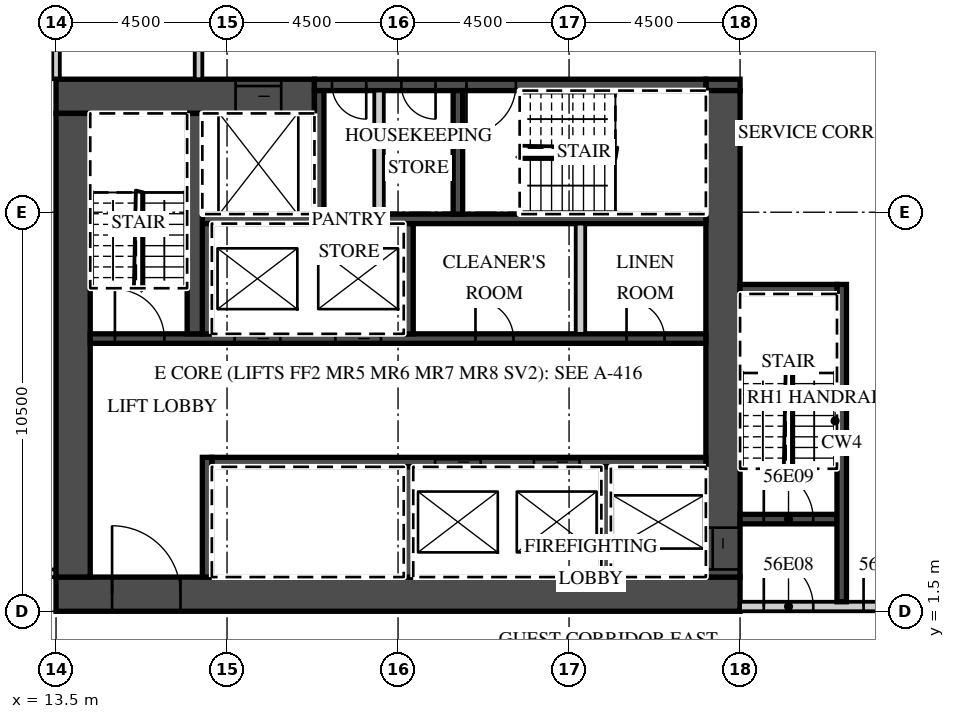
"""IFC4 building model, lengths in metres.
Left out: names, types, materials, properties, quantities, classifications, styles, units other than length and angle.
Written with IfcOpenShell. Run it as: python <this file> out.ifc"""

import sys

from ifc_helpers import new_model, si_unit, direction, frame, frame_2d, origin, place, context, subcontext, project, spatial, rectangle, extrude, element, fill, save


model = new_model("IFC4")
c1 = context("Model", 3, precision=1e-05, world=origin(), true_north=direction((0.0, 1.0)))
c2 = subcontext(c1, "Body", "Model", "MODEL_VIEW")
j1 = project(units=[si_unit("LENGTHUNIT", "METRE"), si_unit("PLANEANGLEUNIT", "RADIAN")], contexts=[c1])
p1 = place(None, origin())
s1 = spatial("IfcSite", under=j1, at=p1, CompositionType="ELEMENT")
p2 = place(p1, origin())
s2 = spatial("IfcBuilding", under=s1, at=p2, CompositionType="ELEMENT")
p3 = place(p2, frame((0.0, 0.0, 230.9)))
s3 = spatial("IfcBuildingStorey", under=s2, at=p3, CompositionType="ELEMENT", Elevation=230.9)
p4 = place(p3, frame((13.5, 15.5, 0.0), z_axis=(0.0, 0.0, 1.0), x_axis=(0.0, 1.0, 0.0)))
e1 = element("IfcWall", 1, at=p4, inside=s3, PredefinedType="PARTITIONING", context=c2, shape_type="SweptSolid", body=[
    extrude(rectangle(XDim=5.436, YDim=0.2, at=frame_2d((2.718, 0.0))), origin(), (0.0, 0.0, 1.0), 3.02),
])
p5 = place(p3, frame((-13.5, 2.5, 0.0), z_axis=(0.0, 0.0, 1.0), x_axis=(1.0, 0.0, 0.0)))
e2 = element("IfcWall", 2, at=p5, inside=s3, PredefinedType="PARTITIONING", context=c2, shape_type="SweptSolid", body=[
    extrude(rectangle(XDim=27.0, YDim=0.2, at=frame_2d((13.5, 0.0))), origin(), (0.0, 0.0, 1.0), 3.02),
])
p6 = place(p5, frame((2.925, 0.0, 0.0)))
e3 = element("IfcOpeningElement", 3, at=p6, cuts=e2, PredefinedType="OPENING", context=c2, shape_type="SweptSolid", body=[
    extrude(rectangle(XDim=1.0, YDim=2.1, at=frame_2d((0.5, 1.05))), frame((0.0, 0.11, 0.0), z_axis=(0.0, -1.0, 0.0), x_axis=(1.0, 0.0, 0.0)), (0.0, 0.0, 1.0), 0.22),
])
p7 = place(p5, frame((6.938, 0.0, 0.0)))
e4 = element("IfcOpeningElement", 4, at=p7, cuts=e2, PredefinedType="OPENING", context=c2, shape_type="SweptSolid", body=[
    extrude(rectangle(XDim=1.2, YDim=2.1, at=frame_2d((0.6, 1.05))), frame((0.0, 0.11, 0.0), z_axis=(0.0, -1.0, 0.0), x_axis=(1.0, 0.0, 0.0)), (0.0, 0.0, 1.0), 0.22),
])
p8 = place(p5, frame((14.075, 0.0, 0.0)))
e5 = element("IfcOpeningElement", 5, at=p8, cuts=e2, PredefinedType="OPENING", context=c2, shape_type="SweptSolid", body=[
    extrude(rectangle(XDim=1.0, YDim=2.1, at=frame_2d((0.5, 1.05))), frame((0.0, 0.11, 0.0), z_axis=(0.0, -1.0, 0.0), x_axis=(1.0, 0.0, 0.0)), (0.0, 0.0, 1.0), 0.22),
])
p9 = place(p5, frame((20.925, 0.0, 0.0)))
e6 = element("IfcOpeningElement", 6, at=p9, cuts=e2, PredefinedType="OPENING", context=c2, shape_type="SweptSolid", body=[
    extrude(rectangle(XDim=1.0, YDim=2.1, at=frame_2d((0.5, 1.05))), frame((0.0, 0.11, 0.0), z_axis=(0.0, -1.0, 0.0), x_axis=(1.0, 0.0, 0.0)), (0.0, 0.0, 1.0), 0.22),
])
p10 = place(p5, frame((25.425, 0.0, 0.0)))
e7 = element("IfcOpeningElement", 7, at=p10, cuts=e2, PredefinedType="OPENING", context=c2, shape_type="SweptSolid", body=[
    extrude(rectangle(XDim=1.0, YDim=2.1, at=frame_2d((0.5, 1.05))), frame((0.0, 0.11, 0.0), z_axis=(0.0, -1.0, 0.0), x_axis=(1.0, 0.0, 0.0)), (0.0, 0.0, 1.0), 0.22),
])
p11 = place(p3, frame((13.5, 1.95, 0.0), z_axis=(0.0, 0.0, 1.0), x_axis=(1.0, 0.0, 0.0)))
e8 = element("IfcWall", 8, at=p11, inside=s3, PredefinedType="SHEAR", context=c2, shape_type="SweptSolid", body=[
    extrude(rectangle(XDim=18.0, YDim=0.9, at=frame_2d((9.0, 0.0))), origin(), (0.0, 0.0, 1.0), 3.02),
])
p12 = place(p11, frame((1.475, 0.0, 0.0)))
e9 = element("IfcOpeningElement", 9, at=p12, cuts=e8, PredefinedType="OPENING", context=c2, shape_type="SweptSolid", body=[
    extrude(rectangle(XDim=1.8, YDim=2.1, at=frame_2d((0.9, 1.05))), frame((0.0, 0.46, 0.0), z_axis=(0.0, -1.0, 0.0), x_axis=(1.0, 0.0, 0.0)), (0.0, 0.0, 1.0), 0.92),
])
p13 = place(p3, frame((13.5, 15.05, 0.0), z_axis=(0.0, 0.0, 1.0), x_axis=(1.0, 0.0, 0.0)))
e10 = element("IfcWall", 10, at=p13, inside=s3, PredefinedType="SHEAR", context=c2, shape_type="SweptSolid", body=[
    extrude(rectangle(XDim=6.8, YDim=0.9, at=frame_2d((3.4, 0.0))), origin(), (0.0, 0.0, 1.0), 3.02),
])
p14 = place(p13, frame((4.725, 0.0, 0.0)))
e11 = element("IfcOpeningElement", 11, at=p14, cuts=e10, PredefinedType="OPENING", context=c2, shape_type="SweptSolid", body=[
    extrude(rectangle(XDim=1.2, YDim=2.1, at=frame_2d((0.6, 1.05))), frame((0.0, 0.46, 0.0), z_axis=(0.0, -1.0, 0.0), x_axis=(1.0, 0.0, 0.0)), (0.0, 0.0, 1.0), 0.92),
])
p15 = place(p3, frame((30.6, 15.35, 0.0), z_axis=(0.0, 0.0, 1.0), x_axis=(1.0, 0.0, 0.0)))
e12 = element("IfcWall", 12, at=p15, inside=s3, PredefinedType="SHEAR", context=c2, shape_type="SweptSolid", body=[
    extrude(rectangle(XDim=0.9, YDim=0.3, at=frame_2d((0.45, 0.0))), origin(), (0.0, 0.0, 1.0), 3.02),
])
p16 = place(p3, frame((20.3, 15.35, 0.0), z_axis=(0.0, 0.0, 1.0), x_axis=(1.0, 0.0, 0.0)))
e13 = element("IfcWall", 13, at=p16, inside=s3, PredefinedType="SHEAR", context=c2, shape_type="SweptSolid", body=[
    extrude(rectangle(XDim=10.3, YDim=0.3, at=frame_2d((5.15, 0.0))), origin(), (0.0, 0.0, 1.0), 3.02),
])
p17 = place(p16, frame((4.0, 0.0, 0.0)))
e14 = element("IfcOpeningElement", 14, at=p17, cuts=e13, PredefinedType="OPENING", context=c2, shape_type="SweptSolid", body=[
    extrude(rectangle(XDim=1.3, YDim=2.1, at=frame_2d((0.65, 1.05))), frame((0.0, 0.16, 0.0), z_axis=(0.0, -1.0, 0.0), x_axis=(1.0, 0.0, 0.0)), (0.0, 0.0, 1.0), 0.32),
])
p18 = place(p16, frame((2.288, 0.0, 0.0)))
e15 = element("IfcOpeningElement", 15, at=p18, cuts=e13, PredefinedType="OPENING", context=c2, shape_type="SweptSolid", body=[
    extrude(rectangle(XDim=0.9, YDim=2.1, at=frame_2d((0.45, 1.05))), frame((0.0, 0.16, 0.0), z_axis=(0.0, -1.0, 0.0), x_axis=(1.0, 0.0, 0.0)), (0.0, 0.0, 1.0), 0.32),
])
p19 = place(p16, frame((0.462, 0.0, 0.0)))
e16 = element("IfcOpeningElement", 16, at=p19, cuts=e13, PredefinedType="OPENING", context=c2, shape_type="SweptSolid", body=[
    extrude(rectangle(XDim=0.9, YDim=2.1, at=frame_2d((0.45, 1.05))), frame((0.0, 0.16, 0.0), z_axis=(0.0, -1.0, 0.0), x_axis=(1.0, 0.0, 0.0)), (0.0, 0.0, 1.0), 0.32),
])
p20 = place(p3, frame((31.05, 2.4, 0.0), z_axis=(0.0, 0.0, 1.0), x_axis=(0.0, 1.0, 0.0)))
e17 = element("IfcWall", 17, at=p20, inside=s3, PredefinedType="SHEAR", context=c2, shape_type="SweptSolid", body=[
    extrude(rectangle(XDim=12.8, YDim=0.9, at=frame_2d((6.4, 0.0))), origin(), (0.0, 0.0, 1.0), 3.02),
])
p21 = place(p20, frame((0.2, 0.0, 0.0)))
e18 = element("IfcOpeningElement", 18, at=p21, cuts=e17, PredefinedType="OPENING", context=c2, shape_type="SweptSolid", body=[
    extrude(rectangle(XDim=1.1, YDim=2.1, at=frame_2d((0.55, 1.05))), frame((0.0, 0.46, 0.0), z_axis=(0.0, -1.0, 0.0), x_axis=(1.0, 0.0, 0.0)), (0.0, 0.0, 1.0), 0.92),
])
p22 = place(p3, frame((13.95, 2.4, 0.0), z_axis=(0.0, 0.0, 1.0), x_axis=(0.0, 1.0, 0.0)))
e19 = element("IfcWall", 19, at=p22, inside=s3, PredefinedType="SHEAR", context=c2, shape_type="SweptSolid", body=[
    extrude(rectangle(XDim=12.2, YDim=0.9, at=frame_2d((6.1, 0.0))), origin(), (0.0, 0.0, 1.0), 3.02),
])
p23 = place(p3, frame((17.6, 5.425, 0.0), z_axis=(0.0, 0.0, 1.0), x_axis=(1.0, 0.0, 0.0)))
e20 = element("IfcWall", 20, at=p23, inside=s3, PredefinedType="SHEAR", context=c2, shape_type="SweptSolid", body=[
    extrude(rectangle(XDim=13.0, YDim=0.25, at=frame_2d((6.5, 0.0))), origin(), (0.0, 0.0, 1.0), 3.02),
])
p24 = place(p23, frame((8.475, 0.0, 0.0)))
e21 = element("IfcOpeningElement", 21, at=p24, cuts=e20, PredefinedType="OPENING", context=c2, shape_type="SweptSolid", body=[
    extrude(rectangle(XDim=1.2, YDim=2.1, at=frame_2d((0.6, 1.05))), frame((0.0, 0.135, 0.0), z_axis=(0.0, -1.0, 0.0), x_axis=(1.0, 0.0, 0.0)), (0.0, 0.0, 1.0), 0.27),
])
p25 = place(p23, frame((5.875, 0.0, 0.0)))
e22 = element("IfcOpeningElement", 22, at=p25, cuts=e20, PredefinedType="OPENING", context=c2, shape_type="SweptSolid", body=[
    extrude(rectangle(XDim=1.2, YDim=2.1, at=frame_2d((0.6, 1.05))), frame((0.0, 0.135, 0.0), z_axis=(0.0, -1.0, 0.0), x_axis=(1.0, 0.0, 0.0)), (0.0, 0.0, 1.0), 0.27),
])
p26 = place(p3, frame((17.475, 2.4, 0.0), z_axis=(0.0, 0.0, 1.0), x_axis=(0.0, 1.0, 0.0)))
e23 = element("IfcWall", 23, at=p26, inside=s3, PredefinedType="SHEAR", context=c2, shape_type="SweptSolid", body=[
    extrude(rectangle(XDim=3.15, YDim=0.25, at=frame_2d((1.575, 0.0))), origin(), (0.0, 0.0, 1.0), 3.02),
])
for number, where, z_axis, x_axis in (
    (24, (27.975, 2.4, 0.0), (0.0, 0.0, 1.0), (0.0, 1.0, 0.0)),
    (25, (22.775, 2.4, 0.0), (0.0, 0.0, 1.0), (0.0, 1.0, 0.0)),
):
    element("IfcWall", number, at=place(p3, frame(where, z_axis=z_axis, x_axis=x_axis)), inside=s3, PredefinedType="SHEAR", context=c2, shape_type="SweptSolid", body=[
        extrude(rectangle(XDim=2.9, YDim=0.25, at=frame_2d((1.45, 0.0))), origin(), (0.0, 0.0, 1.0), 3.02),
    ])
p27 = place(p3, frame((14.4, 8.675, 0.0), z_axis=(0.0, 0.0, 1.0), x_axis=(1.0, 0.0, 0.0)))
e26 = element("IfcWall", 26, at=p27, inside=s3, PredefinedType="SHEAR", context=c2, shape_type="SweptSolid", body=[
    extrude(rectangle(XDim=16.2, YDim=0.25, at=frame_2d((8.1, 0.0))), origin(), (0.0, 0.0, 1.0), 3.02),
])
p28 = place(p27, frame((6.45, 0.0, 0.0)))
e27 = element("IfcOpeningElement", 27, at=p28, cuts=e26, PredefinedType="OPENING", context=c2, shape_type="SweptSolid", body=[
    extrude(rectangle(XDim=1.2, YDim=2.1, at=frame_2d((0.6, 1.05))), frame((0.0, 0.135, 0.0), z_axis=(0.0, -1.0, 0.0), x_axis=(1.0, 0.0, 0.0)), (0.0, 0.0, 1.0), 0.27),
])
p29 = place(p27, frame((3.8, 0.0, 0.0)))
e28 = element("IfcOpeningElement", 28, at=p29, cuts=e26, PredefinedType="OPENING", context=c2, shape_type="SweptSolid", body=[
    extrude(rectangle(XDim=1.2, YDim=2.1, at=frame_2d((0.6, 1.05))), frame((0.0, 0.135, 0.0), z_axis=(0.0, -1.0, 0.0), x_axis=(1.0, 0.0, 0.0)), (0.0, 0.0, 1.0), 0.27),
])
p30 = place(p27, frame((0.65, 0.0, 0.0)))
e29 = element("IfcOpeningElement", 29, at=p30, cuts=e26, PredefinedType="OPENING", context=c2, shape_type="SweptSolid", body=[
    extrude(rectangle(XDim=1.3, YDim=2.1, at=frame_2d((0.65, 1.05))), frame((0.0, 0.135, 0.0), z_axis=(0.0, -1.0, 0.0), x_axis=(1.0, 0.0, 0.0)), (0.0, 0.0, 1.0), 0.27),
])
p31 = place(p27, frame((14.113, 0.0, 0.0)))
e30 = element("IfcOpeningElement", 30, at=p31, cuts=e26, PredefinedType="OPENING", context=c2, shape_type="SweptSolid", body=[
    extrude(rectangle(XDim=1.0, YDim=2.1, at=frame_2d((0.5, 1.05))), frame((0.0, 0.135, 0.0), z_axis=(0.0, -1.0, 0.0), x_axis=(1.0, 0.0, 0.0)), (0.0, 0.0, 1.0), 0.27),
])
p32 = place(p27, frame((10.137, 0.0, 0.0)))
e31 = element("IfcOpeningElement", 31, at=p32, cuts=e26, PredefinedType="OPENING", context=c2, shape_type="SweptSolid", body=[
    extrude(rectangle(XDim=1.0, YDim=2.1, at=frame_2d((0.5, 1.05))), frame((0.0, 0.135, 0.0), z_axis=(0.0, -1.0, 0.0), x_axis=(1.0, 0.0, 0.0)), (0.0, 0.0, 1.0), 0.27),
])
p33 = place(p3, frame((17.35, 11.825, 0.0), z_axis=(0.0, 0.0, 1.0), x_axis=(1.0, 0.0, 0.0)))
e32 = element("IfcWall", 32, at=p33, inside=s3, PredefinedType="SHEAR", context=c2, shape_type="SweptSolid", body=[
    extrude(rectangle(XDim=13.25, YDim=0.25, at=frame_2d((6.625, 0.0))), origin(), (0.0, 0.0, 1.0), 3.02),
])
for number, where, z_axis, x_axis in (
    (33, (17.475, 8.8, 0.0), (0.0, 0.0, 1.0), (0.0, 1.0, 0.0)),
    (34, (22.775, 8.8, 0.0), (0.0, 0.0, 1.0), (0.0, 1.0, 0.0)),
):
    element("IfcWall", number, at=place(p3, frame(where, z_axis=z_axis, x_axis=x_axis)), inside=s3, PredefinedType="SHEAR", context=c2, shape_type="SweptSolid", body=[
        extrude(rectangle(XDim=2.9, YDim=0.25, at=frame_2d((1.45, 0.0))), origin(), (0.0, 0.0, 1.0), 3.02),
    ])
p34 = place(p3, frame((27.3, 8.8, 0.0), z_axis=(0.0, 0.0, 1.0), x_axis=(0.0, 1.0, 0.0)))
e35 = element("IfcWall", 35, at=p34, inside=s3, PredefinedType="PARTITIONING", context=c2, shape_type="SweptSolid", body=[
    extrude(rectangle(XDim=2.9, YDim=0.25, at=frame_2d((1.45, 0.0))), origin(), (0.0, 0.0, 1.0), 3.02),
])
p35 = place(p3, frame((17.15, 8.8, 0.0), z_axis=(0.0, 0.0, 1.0), x_axis=(0.0, 1.0, 0.0)))
e36 = element("IfcWall", 36, at=p35, inside=s3, PredefinedType="SHEAR", context=c2, shape_type="SweptSolid", body=[
    extrude(rectangle(XDim=5.8, YDim=0.4, at=frame_2d((2.9, 0.0))), origin(), (0.0, 0.0, 1.0), 3.02),
])
for number, where, z_axis, x_axis in (
    (37, (20.425, 11.95, 0.0), (0.0, 0.0, 1.0), (0.0, 1.0, 0.0)),
    (38, (24.075, 11.95, 0.0), (0.0, 0.0, 1.0), (0.0, 1.0, 0.0)),
):
    element("IfcWall", number, at=place(p3, frame(where, z_axis=z_axis, x_axis=x_axis)), inside=s3, PredefinedType="SHEAR", context=c2, shape_type="SweptSolid", body=[
        extrude(rectangle(XDim=3.25, YDim=0.25, at=frame_2d((1.625, 0.0))), origin(), (0.0, 0.0, 1.0), 3.02),
    ])
p36 = place(p3, frame((22.0, 11.95, 0.0), z_axis=(0.0, 0.0, 1.0), x_axis=(0.0, 1.0, 0.0)))
e39 = element("IfcWall", 39, at=p36, inside=s3, PredefinedType="PARTITIONING", context=c2, shape_type="SweptSolid", body=[
    extrude(rectangle(XDim=3.25, YDim=0.25, at=frame_2d((1.625, 0.0))), origin(), (0.0, 0.0, 1.0), 3.02),
])
p37 = place(p3, frame((31.5, 1.625, 0.0), z_axis=(0.0, 0.0, 1.0), x_axis=(1.0, 0.0, 0.0)))
e40 = element("IfcWall", 40, at=p37, inside=s3, PredefinedType="PARTITIONING", context=c2, shape_type="SweptSolid", body=[
    extrude(rectangle(XDim=11.04, YDim=0.25, at=frame_2d((5.52, 0.0))), origin(), (0.0, 0.0, 1.0), 3.02),
])
p38 = place(p37, frame((0.625, 0.0, 0.0)))
e41 = element("IfcOpeningElement", 41, at=p38, cuts=e40, PredefinedType="OPENING", context=c2, shape_type="SweptSolid", body=[
    extrude(rectangle(XDim=1.3, YDim=2.1, at=frame_2d((0.65, 1.05))), frame((0.0, 0.135, 0.0), z_axis=(0.0, -1.0, 0.0), x_axis=(1.0, 0.0, 0.0)), (0.0, 0.0, 1.0), 0.27),
])
p39 = place(p37, frame((3.25, 0.0, 0.0)))
e42 = element("IfcOpeningElement", 42, at=p39, cuts=e40, PredefinedType="OPENING", context=c2, shape_type="SweptSolid", body=[
    extrude(rectangle(XDim=1.1, YDim=2.1, at=frame_2d((0.55, 1.05))), frame((0.0, 0.135, 0.0), z_axis=(0.0, -1.0, 0.0), x_axis=(1.0, 0.0, 0.0)), (0.0, 0.0, 1.0), 0.27),
])
p40 = place(p3, frame((31.5, 3.925, 0.0), z_axis=(0.0, 0.0, 1.0), x_axis=(1.0, 0.0, 0.0)))
e43 = element("IfcWall", 43, at=p40, inside=s3, PredefinedType="SHEAR", context=c2, shape_type="SweptSolid", body=[
    extrude(rectangle(XDim=2.55, YDim=0.25, at=frame_2d((1.275, 0.0))), origin(), (0.0, 0.0, 1.0), 3.02),
])
p41 = place(p40, frame((0.625, 0.0, 0.0)))
e44 = element("IfcOpeningElement", 44, at=p41, cuts=e43, PredefinedType="OPENING", context=c2, shape_type="SweptSolid", body=[
    extrude(rectangle(XDim=1.3, YDim=2.1, at=frame_2d((0.65, 1.05))), frame((0.0, 0.135, 0.0), z_axis=(0.0, -1.0, 0.0), x_axis=(1.0, 0.0, 0.0)), (0.0, 0.0, 1.0), 0.27),
])
p42 = place(p3, frame((34.175, 1.75, 0.0), z_axis=(0.0, 0.0, 1.0), x_axis=(0.0, 1.0, 0.0)))
e45 = element("IfcWall", 45, at=p42, inside=s3, PredefinedType="SHEAR", context=c2, shape_type="SweptSolid", body=[
    extrude(rectangle(XDim=8.35, YDim=0.25, at=frame_2d((4.175, 0.0))), origin(), (0.0, 0.0, 1.0), 3.02),
])
p43 = place(p3, frame((31.5, 9.975, 0.0), z_axis=(0.0, 0.0, 1.0), x_axis=(1.0, 0.0, 0.0)))
e46 = element("IfcWall", 46, at=p43, inside=s3, PredefinedType="SHEAR", context=c2, shape_type="SweptSolid", body=[
    extrude(rectangle(XDim=2.55, YDim=0.25, at=frame_2d((1.275, 0.0))), origin(), (0.0, 0.0, 1.0), 3.02),
])
p44 = place(p3, frame((17.25, 15.5, 0.0), z_axis=(0.0, 0.0, 1.0), x_axis=(0.0, 1.0, 0.0)))
e47 = element("IfcWall", 47, at=p44, inside=s3, PredefinedType="PARTITIONING", context=c2, shape_type="SweptSolid", body=[
    extrude(rectangle(XDim=2.2, YDim=0.2, at=frame_2d((1.1, 0.0))), origin(), (0.0, 0.0, 1.0), 3.02),
])
p45 = place(p28, origin())
e48 = element("IfcDoor", 48, at=p45, inside=s3, OperationType="SLIDING_TO_LEFT", PredefinedType="DOOR", context=c2, shape_type="SweptSolid", body=[
    extrude(rectangle(XDim=1.2, YDim=2.1, at=frame_2d((0.6, 1.05))), frame((0.0, 0.025, 0.0), z_axis=(0.0, -1.0, 0.0), x_axis=(1.0, 0.0, 0.0)), (0.0, 0.0, 1.0), 0.05),
])
fill(e27, e48)
p46 = place(p29, origin())
e49 = element("IfcDoor", 49, at=p46, inside=s3, OperationType="SLIDING_TO_RIGHT", PredefinedType="DOOR", context=c2, shape_type="SweptSolid", body=[
    extrude(rectangle(XDim=1.2, YDim=2.1, at=frame_2d((0.6, 1.05))), frame((0.0, 0.025, 0.0), z_axis=(0.0, -1.0, 0.0), x_axis=(1.0, 0.0, 0.0)), (0.0, 0.0, 1.0), 0.05),
])
fill(e28, e49)
p47 = place(p24, origin())
e50 = element("IfcDoor", 50, at=p47, inside=s3, OperationType="SLIDING_TO_LEFT", PredefinedType="DOOR", context=c2, shape_type="SweptSolid", body=[
    extrude(rectangle(XDim=1.2, YDim=2.1, at=frame_2d((0.6, 1.05))), frame((0.0, 0.025, 0.0), z_axis=(0.0, -1.0, 0.0), x_axis=(1.0, 0.0, 0.0)), (0.0, 0.0, 1.0), 0.05),
])
fill(e21, e50)
p48 = place(p25, origin())
e51 = element("IfcDoor", 51, at=p48, inside=s3, OperationType="SLIDING_TO_RIGHT", PredefinedType="DOOR", context=c2, shape_type="SweptSolid", body=[
    extrude(rectangle(XDim=1.2, YDim=2.1, at=frame_2d((0.6, 1.05))), frame((0.0, 0.025, 0.0), z_axis=(0.0, -1.0, 0.0), x_axis=(1.0, 0.0, 0.0)), (0.0, 0.0, 1.0), 0.05),
])
fill(e22, e51)
p49 = place(p14, origin())
e52 = element("IfcDoor", 52, at=p49, inside=s3, OperationType="SLIDING_TO_LEFT", PredefinedType="DOOR", context=c2, shape_type="SweptSolid", body=[
    extrude(rectangle(XDim=1.2, YDim=2.1, at=frame_2d((0.6, 1.05))), frame((0.0, 0.025, 0.0), z_axis=(0.0, -1.0, 0.0), x_axis=(1.0, 0.0, 0.0)), (0.0, 0.0, 1.0), 0.05),
])
fill(e11, e52)
p50 = place(p21, origin())
e53 = element("IfcDoor", 53, at=p50, inside=s3, OperationType="SLIDING_TO_LEFT", PredefinedType="DOOR", context=c2, shape_type="SweptSolid", body=[
    extrude(rectangle(XDim=1.1, YDim=2.1, at=frame_2d((0.55, 1.05))), frame((0.0, 0.025, 0.0), z_axis=(0.0, -1.0, 0.0), x_axis=(1.0, 0.0, 0.0)), (0.0, 0.0, 1.0), 0.05),
])
fill(e18, e53)
p51 = place(p12, origin())
e54 = element("IfcDoor", 54, at=p51, inside=s3, OperationType="DOUBLE_DOOR_DOUBLE_SWING", PredefinedType="DOOR", context=c2, shape_type="SweptSolid", body=[
    extrude(rectangle(XDim=1.8, YDim=2.1, at=frame_2d((0.9, 1.05))), frame((0.0, 0.025, 0.0), z_axis=(0.0, -1.0, 0.0), x_axis=(1.0, 0.0, 0.0)), (0.0, 0.0, 1.0), 0.05),
])
fill(e9, e54)
p52 = place(p38, origin())
e55 = element("IfcDoor", 55, at=p52, inside=s3, OperationType="SINGLE_SWING_LEFT", PredefinedType="DOOR", context=c2, shape_type="SweptSolid", body=[
    extrude(rectangle(XDim=1.3, YDim=2.1, at=frame_2d((0.65, 1.05))), frame((0.0, 0.025, 0.0), z_axis=(0.0, -1.0, 0.0), x_axis=(1.0, 0.0, 0.0)), (0.0, 0.0, 1.0), 0.05),
])
fill(e41, e55)
p53 = place(p41, origin())
e56 = element("IfcDoor", 56, at=p53, inside=s3, OperationType="SINGLE_SWING_LEFT", PredefinedType="DOOR", context=c2, shape_type="SweptSolid", body=[
    extrude(rectangle(XDim=1.3, YDim=2.1, at=frame_2d((0.65, 1.05))), frame((0.0, 0.025, 0.0), z_axis=(0.0, -1.0, 0.0), x_axis=(1.0, 0.0, 0.0)), (0.0, 0.0, 1.0), 0.05),
])
fill(e44, e56)
p54 = place(p39, origin())
e57 = element("IfcDoor", 57, at=p54, inside=s3, OperationType="SINGLE_SWING_LEFT", PredefinedType="DOOR", context=c2, shape_type="SweptSolid", body=[
    extrude(rectangle(XDim=1.1, YDim=2.1, at=frame_2d((0.55, 1.05))), frame((0.0, 0.025, 0.0), z_axis=(0.0, -1.0, 0.0), x_axis=(1.0, 0.0, 0.0)), (0.0, 0.0, 1.0), 0.05),
])
fill(e42, e57)
p55 = place(p30, origin())
e58 = element("IfcDoor", 58, at=p55, inside=s3, OperationType="SINGLE_SWING_LEFT", PredefinedType="DOOR", context=c2, shape_type="SweptSolid", body=[
    extrude(rectangle(XDim=1.3, YDim=2.1, at=frame_2d((0.65, 1.05))), frame((0.0, 0.025, 0.0), z_axis=(0.0, -1.0, 0.0), x_axis=(1.0, 0.0, 0.0)), (0.0, 0.0, 1.0), 0.05),
])
fill(e29, e58)
p56 = place(p17, origin())
e59 = element("IfcDoor", 59, at=p56, inside=s3, OperationType="SINGLE_SWING_LEFT", PredefinedType="DOOR", context=c2, shape_type="SweptSolid", body=[
    extrude(rectangle(XDim=1.3, YDim=2.1, at=frame_2d((0.65, 1.05))), frame((0.0, 0.025, 0.0), z_axis=(0.0, -1.0, 0.0), x_axis=(1.0, 0.0, 0.0)), (0.0, 0.0, 1.0), 0.05),
])
fill(e14, e59)
p57 = place(p18, origin())
e60 = element("IfcDoor", 60, at=p57, inside=s3, OperationType="SINGLE_SWING_RIGHT", PredefinedType="DOOR", context=c2, shape_type="SweptSolid", body=[
    extrude(rectangle(XDim=0.9, YDim=2.1, at=frame_2d((0.45, 1.05))), frame((0.0, 0.025, 0.0), z_axis=(0.0, -1.0, 0.0), x_axis=(1.0, 0.0, 0.0)), (0.0, 0.0, 1.0), 0.05),
])
fill(e15, e60)
p58 = place(p19, origin())
e61 = element("IfcDoor", 61, at=p58, inside=s3, OperationType="SINGLE_SWING_RIGHT", PredefinedType="DOOR", context=c2, shape_type="SweptSolid", body=[
    extrude(rectangle(XDim=0.9, YDim=2.1, at=frame_2d((0.45, 1.05))), frame((0.0, 0.025, 0.0), z_axis=(0.0, -1.0, 0.0), x_axis=(1.0, 0.0, 0.0)), (0.0, 0.0, 1.0), 0.05),
])
fill(e16, e61)
p59 = place(p31, origin())
e62 = element("IfcDoor", 62, at=p59, inside=s3, OperationType="SINGLE_SWING_LEFT", PredefinedType="DOOR", context=c2, shape_type="SweptSolid", body=[
    extrude(rectangle(XDim=1.0, YDim=2.1, at=frame_2d((0.5, 1.05))), frame((0.0, 0.025, 0.0), z_axis=(0.0, -1.0, 0.0), x_axis=(1.0, 0.0, 0.0)), (0.0, 0.0, 1.0), 0.05),
])
fill(e30, e62)
p60 = place(p32, origin())
e63 = element("IfcDoor", 63, at=p60, inside=s3, OperationType="SINGLE_SWING_LEFT", PredefinedType="DOOR", context=c2, shape_type="SweptSolid", body=[
    extrude(rectangle(XDim=1.0, YDim=2.1, at=frame_2d((0.5, 1.05))), frame((0.0, 0.025, 0.0), z_axis=(0.0, -1.0, 0.0), x_axis=(1.0, 0.0, 0.0)), (0.0, 0.0, 1.0), 0.05),
])
fill(e31, e63)
save(model, sys.argv[1])
